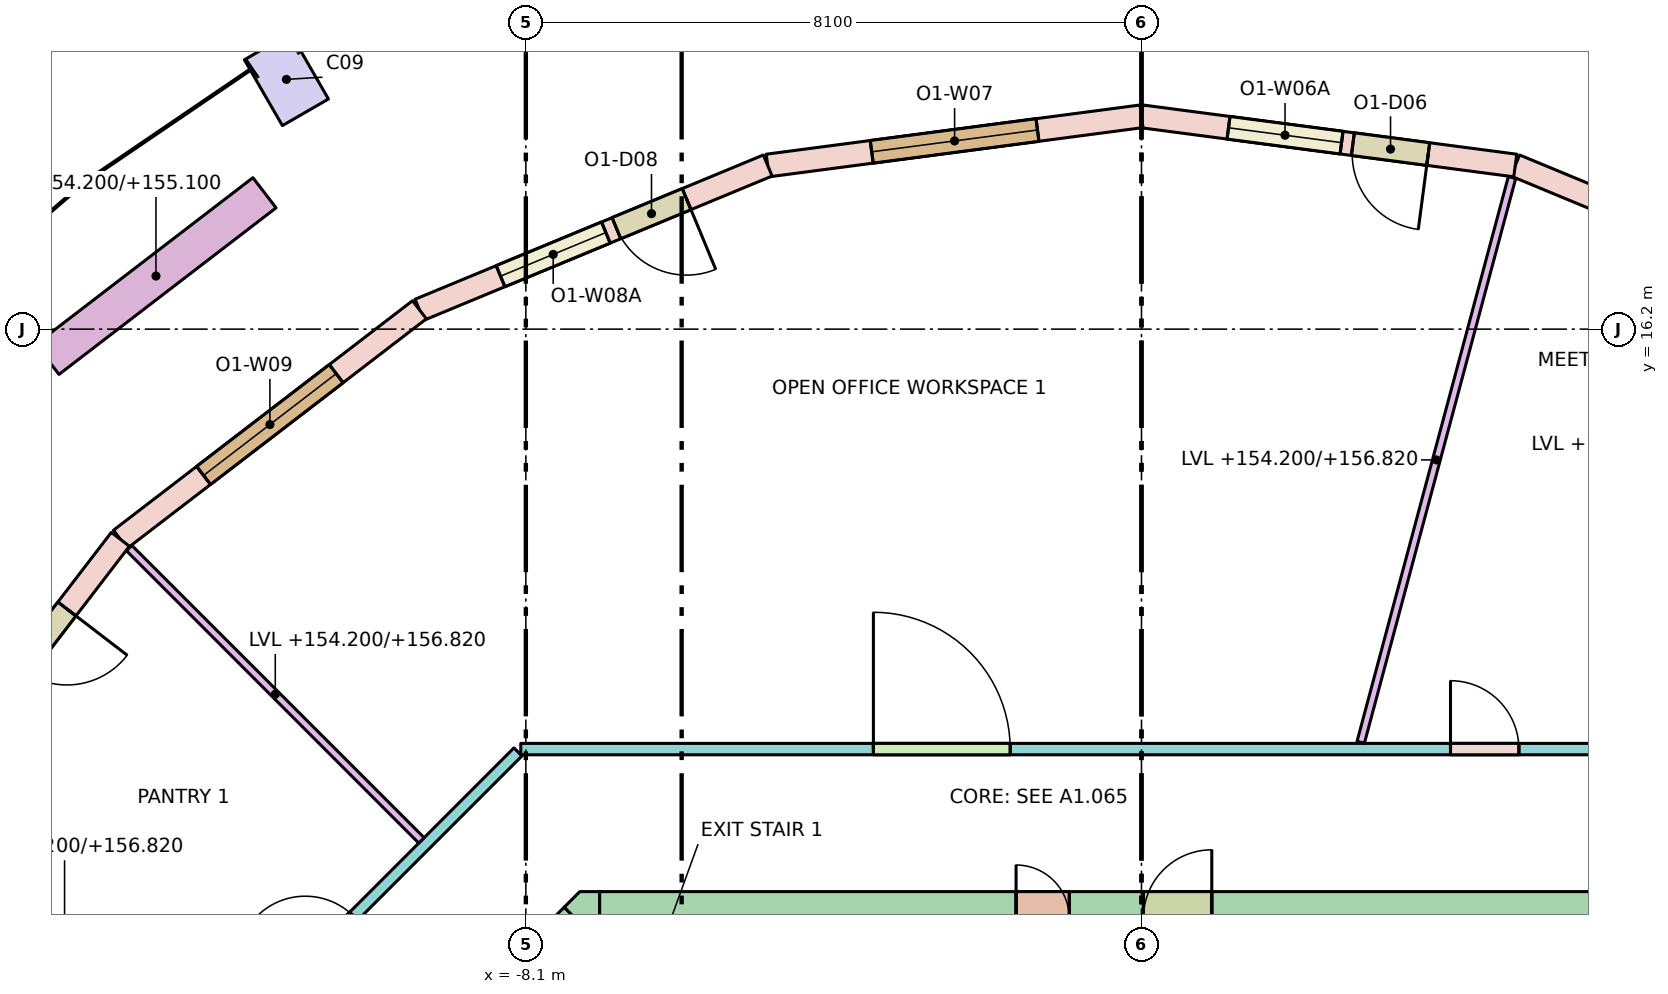
"""IFC4 building model, lengths in metres.
Left out: names, types, materials, properties, quantities, classifications, styles, units other than length and angle.
Written with IfcOpenShell. Run it as: python <this file> out.ifc"""

import sys

from ifc_helpers import new_model, si_unit, direction, frame, frame_2d, origin, origin_2d, place, context, subcontext, project, spatial, polyline, rectangle, outline, extrude, element, fill, save


model = new_model("IFC4")
c1 = context("Model", 3, precision=1e-05, world=origin(), true_north=direction((0.0, 1.0)))
c2 = subcontext(c1, "Body", "Model", "MODEL_VIEW")
j1 = project(units=[si_unit("LENGTHUNIT", "METRE"), si_unit("PLANEANGLEUNIT", "RADIAN")], contexts=[c1])
p1 = place(None, origin())
s1 = spatial("IfcSite", under=j1, at=p1, CompositionType="ELEMENT")
p2 = place(p1, origin())
s2 = spatial("IfcBuilding", under=s1, at=p2, CompositionType="ELEMENT")
p3 = place(p2, frame((0.0, 0.0, 154.2)))
s3 = spatial("IfcBuildingStorey", under=s2, at=p3, CompositionType="ELEMENT", Elevation=154.2)
p4 = place(p3, frame((-11.25, 19.486, 0.0), z_axis=(0.0, 0.0, 1.0), x_axis=(-0.866025403784, -0.5, 0.0)))
e1 = element("IfcColumn", 1, at=p4, inside=s3, PredefinedType="COLUMN", context=c2, shape_type="SweptSolid", body=[
    extrude(rectangle(XDim=0.7, YDim=1.0, at=origin_2d()), origin(), (0.0, 0.0, 1.0), 3.7),
])
p5 = place(p3, frame((-7.13, 8.45, -0.28), z_axis=(0.0, 0.0, 1.0), x_axis=(1.0, 0.0, 0.0)))
e2 = element("IfcWall", 2, at=p5, inside=s3, PredefinedType="SHEAR", context=c2, shape_type="SweptSolid", body=[
    extrude(rectangle(XDim=14.26, YDim=0.7, at=frame_2d((7.13, 0.0))), origin(), (0.0, 0.0, 1.0), 3.7),
])
p6 = place(p5, frame((5.48, 0.0, 0.28)))
e3 = element("IfcOpeningElement", 3, at=p6, cuts=e2, PredefinedType="OPENING", context=c2, shape_type="SweptSolid", body=[
    extrude(rectangle(XDim=0.7, YDim=2.1, at=frame_2d((0.35, 1.05))), frame((0.0, 0.36, 0.0), z_axis=(0.0, -1.0, 0.0), x_axis=(1.0, 0.0, 0.0)), (0.0, 0.0, 1.0), 0.72),
])
p7 = place(p5, frame((7.155, 0.0, 0.28)))
e4 = element("IfcOpeningElement", 4, at=p7, cuts=e2, PredefinedType="OPENING", context=c2, shape_type="SweptSolid", body=[
    extrude(rectangle(XDim=0.9, YDim=2.1, at=frame_2d((0.45, 1.05))), frame((0.0, 0.36, 0.0), z_axis=(0.0, -1.0, 0.0), x_axis=(1.0, 0.0, 0.0)), (0.0, 0.0, 1.0), 0.72),
])
p8 = place(p3, frame((-10.347, 5.347, -0.28), z_axis=(0.0, 0.0, 1.0), x_axis=(0.707106781187, 0.707106781187, 0.0)))
e5 = element("IfcWall", 5, at=p8, inside=s3, PredefinedType="SHEAR", context=c2, shape_type="SweptSolid", body=[
    extrude(rectangle(XDim=4.243, YDim=0.7, at=frame_2d((2.121, 0.0))), origin(), (0.0, 0.0, 1.0), 3.7),
])
p9 = place(p8, frame((0.65, 0.0, 0.28)))
e6 = element("IfcOpeningElement", 6, at=p9, cuts=e5, PredefinedType="OPENING", context=c2, shape_type="SweptSolid", body=[
    extrude(rectangle(XDim=1.2, YDim=2.1, at=frame_2d((0.6, 1.05))), frame((0.0, 0.36, 0.0), z_axis=(0.0, -1.0, 0.0), x_axis=(1.0, 0.0, 0.0)), (0.0, 0.0, 1.0), 0.72),
])
p10 = place(p3, frame((0.0, 0.0, -0.28)))
e7 = element("IfcWall", 7, at=p10, inside=s3, PredefinedType="SHEAR", context=c2, shape_type="SweptSolid", body=[
    extrude(outline(polyline([(-7.39, 8.8), (-7.13, 8.8), (-7.13, 8.8), (-7.13, 8.13), (-7.595, 8.595), (-7.595, 8.595), (-7.595, 8.595), (-7.39, 8.8)])), origin(), (0.0, 0.0, 1.0), 3.7),
])
p11 = place(p3, frame((9.5, 16.455, 0.0), z_axis=(0.0, 0.0, 1.0), x_axis=(-0.923893254961, 0.382650301762, 0.0)))
e8 = element("IfcWall", 8, at=p11, inside=s3, PredefinedType="STANDARD", context=c2, shape_type="SweptSolid", body=[
    extrude(rectangle(XDim=4.96, YDim=0.3, at=frame_2d((2.48, 0.0))), origin(), (0.0, 0.0, 1.0), 3.42),
])
p12 = place(p11, frame((1.38, 0.0, 0.8)))
e9 = element("IfcOpeningElement", 9, at=p12, cuts=e8, PredefinedType="OPENING", context=c2, shape_type="SweptSolid", body=[
    extrude(rectangle(XDim=2.2, YDim=2.4, at=frame_2d((1.1, 1.2))), frame((0.0, 0.16, 0.0), z_axis=(0.0, -1.0, 0.0), x_axis=(1.0, 0.0, 0.0)), (0.0, 0.0, 1.0), 0.32),
])
p13 = place(p3, frame((4.917, 18.353, 0.0), z_axis=(0.0, 0.0, 1.0), x_axis=(-0.991443234469, 0.130538549191, 0.0)))
e10 = element("IfcWall", 10, at=p13, inside=s3, PredefinedType="STANDARD", context=c2, shape_type="SweptSolid", body=[
    extrude(rectangle(XDim=4.96, YDim=0.3, at=frame_2d((2.48, 0.0))), origin(), (0.0, 0.0, 1.0), 3.42),
])
p14 = place(p13, frame((1.155, 0.0, 0.0)))
e11 = element("IfcOpeningElement", 11, at=p14, cuts=e10, PredefinedType="OPENING", context=c2, shape_type="SweptSolid", body=[
    extrude(rectangle(XDim=1.0, YDim=2.4, at=frame_2d((0.5, 1.2))), frame((0.0, 0.16, 0.0), z_axis=(0.0, -1.0, 0.0), x_axis=(1.0, 0.0, 0.0)), (0.0, 0.0, 1.0), 0.32),
])
p15 = place(p13, frame((2.305, 0.0, 0.8)))
e12 = element("IfcOpeningElement", 12, at=p15, cuts=e10, PredefinedType="OPENING", context=c2, shape_type="SweptSolid", body=[
    extrude(rectangle(XDim=1.5, YDim=2.4, at=frame_2d((0.75, 1.2))), frame((0.0, 0.16, 0.0), z_axis=(0.0, -1.0, 0.0), x_axis=(1.0, 0.0, 0.0)), (0.0, 0.0, 1.0), 0.32),
])
p16 = place(p3, frame((0.0, 19.0, 0.0), z_axis=(0.0, 0.0, 1.0), x_axis=(-0.991443234469, -0.130538549191, 0.0)))
e13 = element("IfcWall", 13, at=p16, inside=s3, PredefinedType="STANDARD", context=c2, shape_type="SweptSolid", body=[
    extrude(rectangle(XDim=4.96, YDim=0.3, at=frame_2d((2.48, 0.0))), origin(), (0.0, 0.0, 1.0), 3.42),
])
p17 = place(p16, frame((1.38, 0.0, 0.8)))
e14 = element("IfcOpeningElement", 14, at=p17, cuts=e13, PredefinedType="OPENING", context=c2, shape_type="SweptSolid", body=[
    extrude(rectangle(XDim=2.2, YDim=2.4, at=frame_2d((1.1, 1.2))), frame((0.0, 0.16, 0.0), z_axis=(0.0, -1.0, 0.0), x_axis=(1.0, 0.0, 0.0)), (0.0, 0.0, 1.0), 0.32),
])
p18 = place(p3, frame((-4.917, 18.353, 0.0), z_axis=(0.0, 0.0, 1.0), x_axis=(-0.923893254961, -0.382650301762, 0.0)))
e15 = element("IfcWall", 15, at=p18, inside=s3, PredefinedType="STANDARD", context=c2, shape_type="SweptSolid", body=[
    extrude(rectangle(XDim=4.96, YDim=0.3, at=frame_2d((2.48, 0.0))), origin(), (0.0, 0.0, 1.0), 3.42),
])
p19 = place(p18, frame((1.155, 0.0, 0.0)))
e16 = element("IfcOpeningElement", 16, at=p19, cuts=e15, PredefinedType="OPENING", context=c2, shape_type="SweptSolid", body=[
    extrude(rectangle(XDim=1.0, YDim=2.4, at=frame_2d((0.5, 1.2))), frame((0.0, 0.16, 0.0), z_axis=(0.0, -1.0, 0.0), x_axis=(1.0, 0.0, 0.0)), (0.0, 0.0, 1.0), 0.32),
])
p20 = place(p18, frame((2.305, 0.0, 0.8)))
e17 = element("IfcOpeningElement", 17, at=p20, cuts=e15, PredefinedType="OPENING", context=c2, shape_type="SweptSolid", body=[
    extrude(rectangle(XDim=1.5, YDim=2.4, at=frame_2d((0.75, 1.2))), frame((0.0, 0.16, 0.0), z_axis=(0.0, -1.0, 0.0), x_axis=(1.0, 0.0, 0.0)), (0.0, 0.0, 1.0), 0.32),
])
p21 = place(p3, frame((-9.5, 16.455, 0.0), z_axis=(0.0, 0.0, 1.0), x_axis=(-0.793348024649, -0.608768356425, 0.0)))
e18 = element("IfcWall", 18, at=p21, inside=s3, PredefinedType="STANDARD", context=c2, shape_type="SweptSolid", body=[
    extrude(rectangle(XDim=4.96, YDim=0.3, at=frame_2d((2.48, 0.0))), origin(), (0.0, 0.0, 1.0), 3.42),
])
p22 = place(p21, frame((1.38, 0.0, 0.8)))
e19 = element("IfcOpeningElement", 19, at=p22, cuts=e18, PredefinedType="OPENING", context=c2, shape_type="SweptSolid", body=[
    extrude(rectangle(XDim=2.2, YDim=2.4, at=frame_2d((1.1, 1.2))), frame((0.0, 0.16, 0.0), z_axis=(0.0, -1.0, 0.0), x_axis=(1.0, 0.0, 0.0)), (0.0, 0.0, 1.0), 0.32),
])
p23 = place(p3, frame((-13.435, 13.435, 0.0), z_axis=(0.0, 0.0, 1.0), x_axis=(-0.608768356425, -0.793348024649, 0.0)))
e20 = element("IfcWall", 20, at=p23, inside=s3, PredefinedType="STANDARD", context=c2, shape_type="SweptSolid", body=[
    extrude(rectangle(XDim=4.96, YDim=0.3, at=frame_2d((2.48, 0.0))), origin(), (0.0, 0.0, 1.0), 3.42),
])
p24 = place(p23, frame((1.155, 0.0, 0.0)))
e21 = element("IfcOpeningElement", 21, at=p24, cuts=e20, PredefinedType="OPENING", context=c2, shape_type="SweptSolid", body=[
    extrude(rectangle(XDim=1.0, YDim=2.4, at=frame_2d((0.5, 1.2))), frame((0.0, 0.16, 0.0), z_axis=(0.0, -1.0, 0.0), x_axis=(1.0, 0.0, 0.0)), (0.0, 0.0, 1.0), 0.32),
])
p25 = place(p23, frame((2.305, 0.0, 0.8)))
e22 = element("IfcOpeningElement", 22, at=p25, cuts=e20, PredefinedType="OPENING", context=c2, shape_type="SweptSolid", body=[
    extrude(rectangle(XDim=1.5, YDim=2.4, at=frame_2d((0.75, 1.2))), frame((0.0, 0.16, 0.0), z_axis=(0.0, -1.0, 0.0), x_axis=(1.0, 0.0, 0.0)), (0.0, 0.0, 1.0), 0.32),
])
p26 = place(p3, frame((-11.539, 17.994, 0.0), z_axis=(0.0, 0.0, 1.0), x_axis=(-0.793384730612, -0.608720518162, 0.0)))
e23 = element("IfcWall", 23, at=p26, inside=s3, PredefinedType="PARAPET", context=c2, shape_type="SweptSolid", body=[
    extrude(rectangle(XDim=3.6, YDim=0.5, at=frame_2d((1.8, 0.0))), origin(), (0.0, 0.0, 1.0), 0.9),
])
p27 = place(p3, frame((-12.638, 6.204, 0.0), z_axis=(0.0, 0.0, 1.0), x_axis=(0.707106781187, 0.707106781187, 0.0)))
e24 = element("IfcWall", 24, at=p27, inside=s3, PredefinedType="PARTITIONING", context=c2, shape_type="SweptSolid", body=[
    extrude(rectangle(XDim=6.271, YDim=0.15, at=frame_2d((3.135, 0.0))), origin(), (0.0, 0.0, 1.0), 2.62),
])
p28 = place(p27, frame((2.314, 0.0, 0.0)))
e25 = element("IfcOpeningElement", 25, at=p28, cuts=e24, PredefinedType="OPENING", context=c2, shape_type="SweptSolid", body=[
    extrude(rectangle(XDim=0.9, YDim=2.1, at=frame_2d((0.45, 1.05))), frame((0.0, 0.085, 0.0), z_axis=(0.0, -1.0, 0.0), x_axis=(1.0, 0.0, 0.0)), (0.0, 0.0, 1.0), 0.17),
])
p29 = place(p3, frame((-8.167, 10.675, 0.0), z_axis=(0.0, 0.0, 1.0), x_axis=(1.0, 0.0, 0.0)))
e26 = element("IfcWall", 26, at=p29, inside=s3, PredefinedType="PARTITIONING", context=c2, shape_type="SweptSolid", body=[
    extrude(rectangle(XDim=16.333, YDim=0.15, at=frame_2d((8.167, 0.0))), origin(), (0.0, 0.0, 1.0), 2.62),
])
p30 = place(p29, frame((12.232, 0.0, 0.0)))
e27 = element("IfcOpeningElement", 27, at=p30, cuts=e26, PredefinedType="OPENING", context=c2, shape_type="SweptSolid", body=[
    extrude(rectangle(XDim=0.9, YDim=2.1, at=frame_2d((0.45, 1.05))), frame((0.0, 0.085, 0.0), z_axis=(0.0, -1.0, 0.0), x_axis=(1.0, 0.0, 0.0)), (0.0, 0.0, 1.0), 0.17),
])
p31 = place(p29, frame((4.639, 0.0, 0.0)))
e28 = element("IfcOpeningElement", 28, at=p31, cuts=e26, PredefinedType="OPENING", context=c2, shape_type="SweptSolid", body=[
    extrude(rectangle(XDim=1.8, YDim=2.1, at=frame_2d((0.9, 1.05))), frame((0.0, 0.085, 0.0), z_axis=(0.0, -1.0, 0.0), x_axis=(1.0, 0.0, 0.0)), (0.0, 0.0, 1.0), 0.17),
])
p32 = place(p3, frame((2.884, 10.764, 0.0), z_axis=(0.0, 0.0, 1.0), x_axis=(0.25881804804, 0.965926093451, 0.0)))
e29 = element("IfcWall", 29, at=p32, inside=s3, PredefinedType="PARTITIONING", context=c2, shape_type="SweptSolid", body=[
    extrude(rectangle(XDim=7.693, YDim=0.1, at=frame_2d((3.846, 0.0))), origin(), (0.0, 0.0, 1.0), 2.62),
])
p33 = place(p3, frame((-9.474, 9.474, 0.0), z_axis=(0.0, 0.0, 1.0), x_axis=(-0.707106781187, 0.707106781187, 0.0)))
e30 = element("IfcWall", 30, at=p33, inside=s3, PredefinedType="PARTITIONING", context=c2, shape_type="SweptSolid", body=[
    extrude(rectangle(XDim=5.439, YDim=0.1, at=frame_2d((2.719, 0.0))), origin(), (0.0, 0.0, 1.0), 2.62),
])
p34 = place(p3, frame((-12.025, 6.943, 0.0), z_axis=(0.0, 0.0, 1.0), x_axis=(-0.866025463095, 0.499999897272, 0.0)))
e31 = element("IfcWall", 31, at=p34, inside=s3, PredefinedType="PARTITIONING", context=c2, shape_type="SweptSolid", body=[
    extrude(rectangle(XDim=4.951, YDim=0.1, at=frame_2d((2.476, 0.0))), origin(), (0.0, 0.0, 1.0), 2.62),
])
p35 = place(p14, origin())
e32 = element("IfcDoor", 32, at=p35, inside=s3, OperationType="SINGLE_SWING_LEFT", PredefinedType="DOOR", context=c2, shape_type="SweptSolid", body=[
    extrude(rectangle(XDim=1.0, YDim=2.4, at=frame_2d((0.5, 1.2))), frame((0.0, 0.025, 0.0), z_axis=(0.0, -1.0, 0.0), x_axis=(1.0, 0.0, 0.0)), (0.0, 0.0, 1.0), 0.05),
])
fill(e11, e32)
p36 = place(p15, origin())
e33 = element("IfcWindow", 33, at=p36, inside=s3, PartitioningType="SINGLE_PANEL", PredefinedType="WINDOW", context=c2, shape_type="SweptSolid", body=[
    extrude(rectangle(XDim=1.5, YDim=2.4, at=frame_2d((0.75, 1.2))), frame((0.0, 0.03, 0.0), z_axis=(0.0, -1.0, 0.0), x_axis=(1.0, 0.0, 0.0)), (0.0, 0.0, 1.0), 0.06),
])
fill(e12, e33)
p37 = place(p17, origin())
e34 = element("IfcWindow", 34, at=p37, inside=s3, PartitioningType="SINGLE_PANEL", PredefinedType="WINDOW", context=c2, shape_type="SweptSolid", body=[
    extrude(rectangle(XDim=2.2, YDim=2.4, at=frame_2d((1.1, 1.2))), frame((0.0, 0.03, 0.0), z_axis=(0.0, -1.0, 0.0), x_axis=(1.0, 0.0, 0.0)), (0.0, 0.0, 1.0), 0.06),
])
fill(e14, e34)
p38 = place(p19, origin())
e35 = element("IfcDoor", 35, at=p38, inside=s3, OperationType="SINGLE_SWING_LEFT", PredefinedType="DOOR", context=c2, shape_type="SweptSolid", body=[
    extrude(rectangle(XDim=1.0, YDim=2.4, at=frame_2d((0.5, 1.2))), frame((0.0, 0.025, 0.0), z_axis=(0.0, -1.0, 0.0), x_axis=(1.0, 0.0, 0.0)), (0.0, 0.0, 1.0), 0.05),
])
fill(e16, e35)
p39 = place(p20, origin())
e36 = element("IfcWindow", 36, at=p39, inside=s3, PartitioningType="SINGLE_PANEL", PredefinedType="WINDOW", context=c2, shape_type="SweptSolid", body=[
    extrude(rectangle(XDim=1.5, YDim=2.4, at=frame_2d((0.75, 1.2))), frame((0.0, 0.03, 0.0), z_axis=(0.0, -1.0, 0.0), x_axis=(1.0, 0.0, 0.0)), (0.0, 0.0, 1.0), 0.06),
])
fill(e17, e36)
p40 = place(p22, origin())
e37 = element("IfcWindow", 37, at=p40, inside=s3, PartitioningType="SINGLE_PANEL", PredefinedType="WINDOW", context=c2, shape_type="SweptSolid", body=[
    extrude(rectangle(XDim=2.2, YDim=2.4, at=frame_2d((1.1, 1.2))), frame((0.0, 0.03, 0.0), z_axis=(0.0, -1.0, 0.0), x_axis=(1.0, 0.0, 0.0)), (0.0, 0.0, 1.0), 0.06),
])
fill(e19, e37)
p41 = place(p24, origin())
e38 = element("IfcDoor", 38, at=p41, inside=s3, OperationType="SINGLE_SWING_LEFT", PredefinedType="DOOR", context=c2, shape_type="SweptSolid", body=[
    extrude(rectangle(XDim=1.0, YDim=2.4, at=frame_2d((0.5, 1.2))), frame((0.0, 0.025, 0.0), z_axis=(0.0, -1.0, 0.0), x_axis=(1.0, 0.0, 0.0)), (0.0, 0.0, 1.0), 0.05),
])
fill(e21, e38)
p42 = place(p30, origin())
e39 = element("IfcDoor", 39, at=p42, inside=s3, OperationType="SINGLE_SWING_LEFT", PredefinedType="DOOR", context=c2, shape_type="SweptSolid", body=[
    extrude(rectangle(XDim=0.9, YDim=2.1, at=frame_2d((0.45, 1.05))), frame((0.0, 0.025, 0.0), z_axis=(0.0, -1.0, 0.0), x_axis=(1.0, 0.0, 0.0)), (0.0, 0.0, 1.0), 0.05),
])
fill(e27, e39)
p43 = place(p31, origin())
e40 = element("IfcDoor", 40, at=p43, inside=s3, OperationType="DOUBLE_DOOR_SINGLE_SWING", PredefinedType="DOOR", context=c2, shape_type="SweptSolid", body=[
    extrude(rectangle(XDim=1.8, YDim=2.1, at=frame_2d((0.9, 1.05))), frame((0.0, 0.025, 0.0), z_axis=(0.0, -1.0, 0.0), x_axis=(1.0, 0.0, 0.0)), (0.0, 0.0, 1.0), 0.05),
])
fill(e28, e40)
save(model, sys.argv[1])
